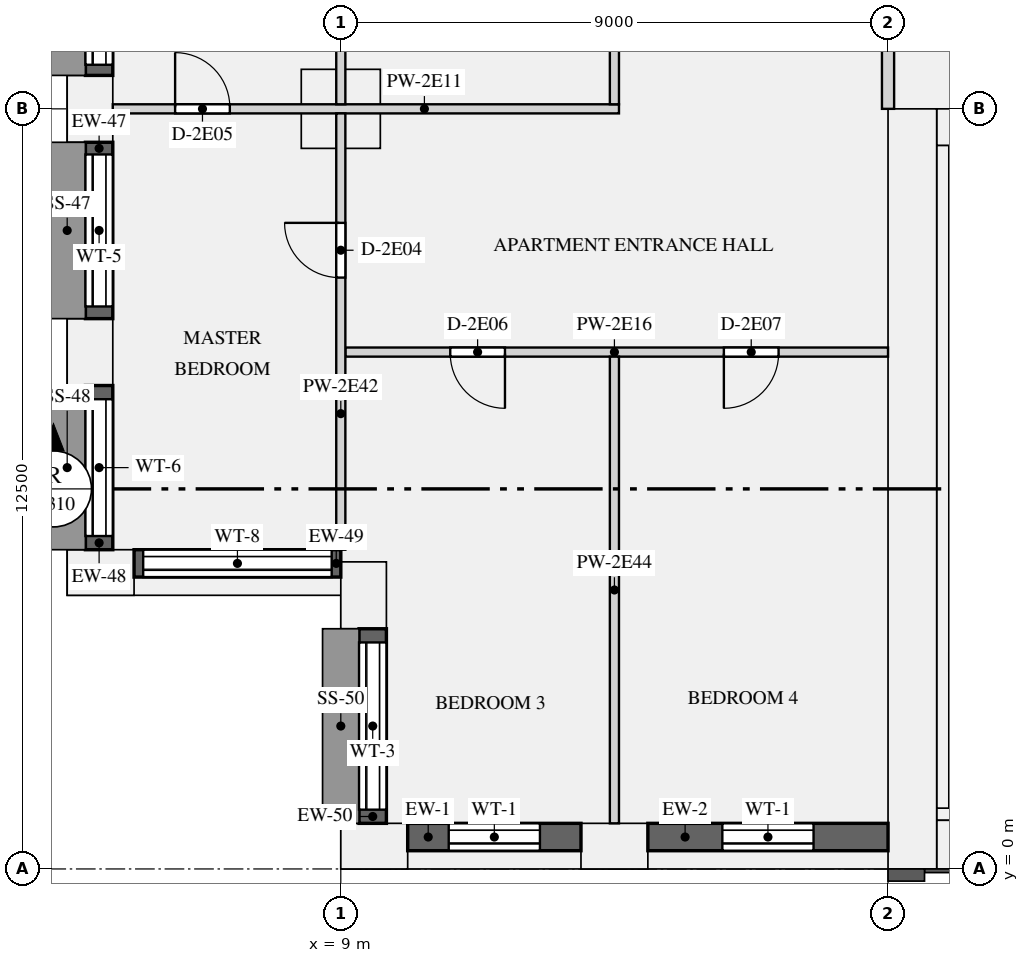
"""IFC4 building model, lengths in metres.
Left out: names, types, materials, properties, quantities, classifications, styles, units other than length and angle.
Written with IfcOpenShell. Run it as: python <this file> out.ifc"""

import sys

from ifc_helpers import new_model, si_unit, direction, frame, frame_2d, origin, origin_2d, place, context, subcontext, project, spatial, rectangle, extrude, element, fill, save


model = new_model("IFC4")
c1 = context("Model", 3, precision=1e-05, world=origin(), true_north=direction((0.0, 1.0)))
c2 = subcontext(c1, "Body", "Model", "MODEL_VIEW")
j1 = project(units=[si_unit("LENGTHUNIT", "METRE"), si_unit("PLANEANGLEUNIT", "RADIAN")], contexts=[c1])
p1 = place(None, origin())
s1 = spatial("IfcSite", under=j1, at=p1, CompositionType="ELEMENT")
p2 = place(p1, origin())
s2 = spatial("IfcBuilding", under=s1, at=p2, CompositionType="ELEMENT")
p3 = place(p2, frame((0.0, 0.0, 118.2)))
s3 = spatial("IfcBuildingStorey", under=s2, at=p3, CompositionType="ELEMENT", Elevation=118.2)
for number, where, z_axis, x_axis in (
    (1, (9.55, 0.375, 0.0), (0.0, 0.0, 1.0), (1.0, 0.0, 0.0)),
    (2, (13.5, 0.375, 0.0), (0.0, 0.0, 1.0), (1.0, 0.0, 0.0)),
    (3, (4.875, 12.5, 0.0), (0.0, 0.0, 1.0), (0.0, -1.0, 0.0)),
    (4, (4.875, 8.5, 0.0), (0.0, 0.0, 1.0), (0.0, -1.0, 0.0)),
    (5, (5.05, 4.875, 0.0), (0.0, 0.0, 1.0), (1.0, 0.0, 0.0)),
    (6, (9.375, 4.5, 0.0), (0.0, 0.0, 1.0), (0.0, -1.0, 0.0)),
):
    element("IfcColumn", number, at=place(p3, frame(where, z_axis=z_axis, x_axis=x_axis)), inside=s3, PredefinedType="USERDEFINED", context=c2, shape_type="SweptSolid", body=[
        extrude(rectangle(XDim=1.1, YDim=0.75, at=origin_2d()), origin(), (0.0, 0.0, 1.0), 3.15),
    ])
p4 = place(p3, frame((9.0, 12.5, 0.0), z_axis=(0.0, 0.0, 1.0), x_axis=(1.0, 0.0, 0.0)))
e7 = element("IfcColumn", 7, at=p4, inside=s3, PredefinedType="COLUMN", context=c2, shape_type="SweptSolid", body=[
    extrude(rectangle(XDim=1.3, YDim=1.3, at=origin_2d()), origin(), (0.0, 0.0, 1.0), 3.15),
])
p5 = place(p3, frame((18.4, 0.0, 0.0), z_axis=(0.0, 0.0, 1.0), x_axis=(0.0, 1.0, 0.0)))
e8 = element("IfcWall", 8, at=p5, inside=s3, PredefinedType="SHEAR", context=c2, shape_type="SweptSolid", body=[
    extrude(rectangle(XDim=12.5, YDim=0.8, at=frame_2d((6.25, 0.0))), origin(), (0.0, 0.0, 1.0), 3.15),
])
p6 = place(p3, frame((18.8, 0.4, 0.0), z_axis=(0.0, 0.0, 1.0), x_axis=(1.0, 0.0, 0.0)))
e9 = element("IfcWall", 9, at=p6, inside=s3, PredefinedType="SHEAR", context=c2, shape_type="SweptSolid", body=[
    extrude(rectangle(XDim=34.4, YDim=0.8, at=frame_2d((17.2, 0.0))), origin(), (0.0, 0.0, 1.0), 3.15),
])
p7 = place(p3, frame((18.8, 12.2, 0.0), z_axis=(0.0, 0.0, 1.0), x_axis=(1.0, 0.0, 0.0)))
e10 = element("IfcWall", 10, at=p7, inside=s3, PredefinedType="SHEAR", context=c2, shape_type="SweptSolid", body=[
    extrude(rectangle(XDim=34.4, YDim=0.6, at=frame_2d((17.2, 0.0))), origin(), (0.0, 0.0, 1.0), 3.15),
])
p8 = place(p7, frame((24.375, 0.0, 0.0)))
e11 = element("IfcOpeningElement", 11, at=p8, cuts=e10, PredefinedType="OPENING", context=c2, shape_type="SweptSolid", body=[
    extrude(rectangle(XDim=1.1, YDim=2.1, at=frame_2d((0.55, 1.05))), frame((0.0, 0.31, 0.0), z_axis=(0.0, -1.0, 0.0), x_axis=(1.0, 0.0, 0.0)), (0.0, 0.0, 1.0), 0.62),
])
p9 = place(p7, frame((26.625, 0.0, 0.0)))
e12 = element("IfcOpeningElement", 12, at=p9, cuts=e10, PredefinedType="OPENING", context=c2, shape_type="SweptSolid", body=[
    extrude(rectangle(XDim=1.1, YDim=2.1, at=frame_2d((0.55, 1.05))), frame((0.0, 0.31, 0.0), z_axis=(0.0, -1.0, 0.0), x_axis=(1.0, 0.0, 0.0)), (0.0, 0.0, 1.0), 0.62),
])
p10 = place(p7, frame((28.875, 0.0, 0.0)))
e13 = element("IfcOpeningElement", 13, at=p10, cuts=e10, PredefinedType="OPENING", context=c2, shape_type="SweptSolid", body=[
    extrude(rectangle(XDim=1.1, YDim=2.1, at=frame_2d((0.55, 1.05))), frame((0.0, 0.31, 0.0), z_axis=(0.0, -1.0, 0.0), x_axis=(1.0, 0.0, 0.0)), (0.0, 0.0, 1.0), 0.62),
])
p11 = place(p7, frame((11.75, 0.0, 0.0)))
e14 = element("IfcOpeningElement", 14, at=p11, cuts=e10, PredefinedType="OPENING", context=c2, shape_type="SweptSolid", body=[
    extrude(rectangle(XDim=0.9, YDim=2.1, at=frame_2d((0.45, 1.05))), frame((0.0, 0.31, 0.0), z_axis=(0.0, -1.0, 0.0), x_axis=(1.0, 0.0, 0.0)), (0.0, 0.0, 1.0), 0.62),
])
p12 = place(p7, frame((18.25, 0.0, 0.0)))
e15 = element("IfcOpeningElement", 15, at=p12, cuts=e10, PredefinedType="OPENING", context=c2, shape_type="SweptSolid", body=[
    extrude(rectangle(XDim=0.9, YDim=2.1, at=frame_2d((0.45, 1.05))), frame((0.0, 0.31, 0.0), z_axis=(0.0, -1.0, 0.0), x_axis=(1.0, 0.0, 0.0)), (0.0, 0.0, 1.0), 0.62),
])
p13 = place(p7, frame((1.35, 0.0, 0.0)))
e16 = element("IfcOpeningElement", 16, at=p13, cuts=e10, PredefinedType="OPENING", context=c2, shape_type="SweptSolid", body=[
    extrude(rectangle(XDim=1.2, YDim=2.1, at=frame_2d((0.6, 1.05))), frame((0.0, 0.31, 0.0), z_axis=(0.0, -1.0, 0.0), x_axis=(1.0, 0.0, 0.0)), (0.0, 0.0, 1.0), 0.62),
])
p14 = place(p7, frame((31.85, 0.0, 0.0)))
e17 = element("IfcOpeningElement", 17, at=p14, cuts=e10, PredefinedType="OPENING", context=c2, shape_type="SweptSolid", body=[
    extrude(rectangle(XDim=1.2, YDim=2.1, at=frame_2d((0.6, 1.05))), frame((0.0, 0.31, 0.0), z_axis=(0.0, -1.0, 0.0), x_axis=(1.0, 0.0, 0.0)), (0.0, 0.0, 1.0), 0.62),
])
p15 = place(p3, frame((18.9, 1.0, 0.0), z_axis=(0.0, 0.0, 1.0), x_axis=(0.0, 1.0, 0.0)))
e18 = element("IfcWall", 18, at=p15, inside=s3, PredefinedType="SHEAR", context=c2, shape_type="SweptSolid", body=[
    extrude(rectangle(XDim=10.9, YDim=0.2, at=frame_2d((5.45, 0.0))), origin(), (0.0, 0.0, 1.0), 3.15),
])
p16 = place(p3, frame((18.8, 0.9, 0.0), z_axis=(0.0, 0.0, 1.0), x_axis=(1.0, 0.0, 0.0)))
e19 = element("IfcWall", 19, at=p16, inside=s3, PredefinedType="SHEAR", context=c2, shape_type="SweptSolid", body=[
    extrude(rectangle(XDim=34.4, YDim=0.2, at=frame_2d((17.2, 0.0))), origin(), (0.0, 0.0, 1.0), 3.15),
])
p17 = place(p3, frame((19.0, 3.4, 0.0), z_axis=(0.0, 0.0, 1.0), x_axis=(1.0, 0.0, 0.0)))
e20 = element("IfcWall", 20, at=p17, inside=s3, PredefinedType="SHEAR", context=c2, shape_type="SweptSolid", body=[
    extrude(rectangle(XDim=2.55, YDim=0.3, at=frame_2d((1.275, 0.0))), origin(), (0.0, 0.0, 1.0), 3.15),
])
p18 = place(p17, frame((0.675, 0.0, 0.0)))
e21 = element("IfcOpeningElement", 21, at=p18, cuts=e20, PredefinedType="OPENING", context=c2, shape_type="SweptSolid", body=[
    extrude(rectangle(XDim=1.2, YDim=2.1, at=frame_2d((0.6, 1.05))), frame((0.0, 0.16, 0.0), z_axis=(0.0, -1.0, 0.0), x_axis=(1.0, 0.0, 0.0)), (0.0, 0.0, 1.0), 0.32),
])
p19 = place(p3, frame((10.1, 0.525, 0.9), z_axis=(0.0, 0.0, 1.0), x_axis=(1.0, 0.0, 0.0)))
e22 = element("IfcWall", 22, at=p19, inside=s3, PredefinedType="SOLIDWALL", context=c2, shape_type="SweptSolid", body=[
    extrude(rectangle(XDim=2.85, YDim=0.45, at=frame_2d((1.425, 0.0))), origin(), (0.0, 0.0, 1.0), 1.93),
])
p20 = place(p19, frame((0.675, 0.0, 0.15)))
e23 = element("IfcOpeningElement", 23, at=p20, cuts=e22, PredefinedType="OPENING", context=c2, shape_type="SweptSolid", body=[
    extrude(rectangle(XDim=1.5, YDim=1.5, at=frame_2d((0.75, 0.75))), frame((0.0, 0.235, 0.0), z_axis=(0.0, -1.0, 0.0), x_axis=(1.0, 0.0, 0.0)), (0.0, 0.0, 1.0), 0.47),
])
p21 = place(p3, frame((14.05, 0.525, 0.9), z_axis=(0.0, 0.0, 1.0), x_axis=(1.0, 0.0, 0.0)))
e24 = element("IfcWall", 24, at=p21, inside=s3, PredefinedType="SOLIDWALL", context=c2, shape_type="SweptSolid", body=[
    extrude(rectangle(XDim=3.95, YDim=0.45, at=frame_2d((1.975, 0.0))), origin(), (0.0, 0.0, 1.0), 1.93),
])
p22 = place(p21, frame((1.225, 0.0, 0.15)))
e25 = element("IfcOpeningElement", 25, at=p22, cuts=e24, PredefinedType="OPENING", context=c2, shape_type="SweptSolid", body=[
    extrude(rectangle(XDim=1.5, YDim=1.5, at=frame_2d((0.75, 0.75))), frame((0.0, 0.235, 0.0), z_axis=(0.0, -1.0, 0.0), x_axis=(1.0, 0.0, 0.0)), (0.0, 0.0, 1.0), 0.47),
])
p23 = place(p3, frame((5.025, 15.4, 0.9), z_axis=(0.0, 0.0, 1.0), x_axis=(0.0, -1.0, 0.0)))
e26 = element("IfcWall", 26, at=p23, inside=s3, PredefinedType="SOLIDWALL", context=c2, shape_type="SweptSolid", body=[
    extrude(rectangle(XDim=2.35, YDim=0.45, at=frame_2d((1.175, 0.0))), origin(), (0.0, 0.0, 1.0), 1.93),
])
p24 = place(p23, frame((0.175, 0.0, 0.15)))
e27 = element("IfcOpeningElement", 27, at=p24, cuts=e26, PredefinedType="OPENING", context=c2, shape_type="SweptSolid", body=[
    extrude(rectangle(XDim=2.0, YDim=1.5, at=frame_2d((1.0, 0.75))), frame((0.0, 0.235, 0.0), z_axis=(0.0, -1.0, 0.0), x_axis=(1.0, 0.0, 0.0)), (0.0, 0.0, 1.0), 0.47),
])
p25 = place(p3, frame((5.025, 11.95, 0.9), z_axis=(0.0, 0.0, 1.0), x_axis=(0.0, -1.0, 0.0)))
e28 = element("IfcWall", 28, at=p25, inside=s3, PredefinedType="SOLIDWALL", context=c2, shape_type="SweptSolid", body=[
    extrude(rectangle(XDim=2.9, YDim=0.45, at=frame_2d((1.45, 0.0))), origin(), (0.0, 0.0, 1.0), 1.93),
])
p26 = place(p25, frame((0.2, 0.0, 0.15)))
e29 = element("IfcOpeningElement", 29, at=p26, cuts=e28, PredefinedType="OPENING", context=c2, shape_type="SweptSolid", body=[
    extrude(rectangle(XDim=2.5, YDim=1.5, at=frame_2d((1.25, 0.75))), frame((0.0, 0.235, 0.0), z_axis=(0.0, -1.0, 0.0), x_axis=(1.0, 0.0, 0.0)), (0.0, 0.0, 1.0), 0.47),
])
p27 = place(p3, frame((5.025, 7.95, 0.9), z_axis=(0.0, 0.0, 1.0), x_axis=(0.0, -1.0, 0.0)))
e30 = element("IfcWall", 30, at=p27, inside=s3, PredefinedType="SOLIDWALL", context=c2, shape_type="SweptSolid", body=[
    extrude(rectangle(XDim=2.7, YDim=0.45, at=frame_2d((1.35, 0.0))), origin(), (0.0, 0.0, 1.0), 1.93),
])
p28 = place(p27, frame((0.225, 0.0, 0.15)))
e31 = element("IfcOpeningElement", 31, at=p28, cuts=e30, PredefinedType="OPENING", context=c2, shape_type="SweptSolid", body=[
    extrude(rectangle(XDim=2.25, YDim=1.5, at=frame_2d((1.125, 0.75))), frame((0.0, 0.235, 0.0), z_axis=(0.0, -1.0, 0.0), x_axis=(1.0, 0.0, 0.0)), (0.0, 0.0, 1.0), 0.47),
])
p29 = place(p3, frame((5.6, 5.025, 0.9), z_axis=(0.0, 0.0, 1.0), x_axis=(1.0, 0.0, 0.0)))
e32 = element("IfcWall", 32, at=p29, inside=s3, PredefinedType="SOLIDWALL", context=c2, shape_type="SweptSolid", body=[
    extrude(rectangle(XDim=3.4, YDim=0.45, at=frame_2d((1.7, 0.0))), origin(), (0.0, 0.0, 1.0), 1.93),
])
p30 = place(p29, frame((0.15, 0.0, 0.15)))
e33 = element("IfcOpeningElement", 33, at=p30, cuts=e32, PredefinedType="OPENING", context=c2, shape_type="SweptSolid", body=[
    extrude(rectangle(XDim=3.1, YDim=1.5, at=frame_2d((1.55, 0.75))), frame((0.0, 0.235, 0.0), z_axis=(0.0, -1.0, 0.0), x_axis=(1.0, 0.0, 0.0)), (0.0, 0.0, 1.0), 0.47),
])
p31 = place(p3, frame((9.525, 3.95, 0.9), z_axis=(0.0, 0.0, 1.0), x_axis=(0.0, -1.0, 0.0)))
e34 = element("IfcWall", 34, at=p31, inside=s3, PredefinedType="SOLIDWALL", context=c2, shape_type="SweptSolid", body=[
    extrude(rectangle(XDim=3.2, YDim=0.45, at=frame_2d((1.6, 0.0))), origin(), (0.0, 0.0, 1.0), 1.93),
])
p32 = place(p31, frame((0.225, 0.0, 0.15)))
e35 = element("IfcOpeningElement", 35, at=p32, cuts=e34, PredefinedType="OPENING", context=c2, shape_type="SweptSolid", body=[
    extrude(rectangle(XDim=2.75, YDim=1.5, at=frame_2d((1.375, 0.75))), frame((0.0, 0.235, 0.0), z_axis=(0.0, -1.0, 0.0), x_axis=(1.0, 0.0, 0.0)), (0.0, 0.0, 1.0), 0.47),
])
p33 = place(p3, frame((18.0, 12.5, 0.0), z_axis=(0.0, 0.0, 1.0), x_axis=(0.0, 1.0, 0.0)))
e36 = element("IfcWall", 36, at=p33, inside=s3, PredefinedType="PARTITIONING", context=c2, shape_type="SweptSolid", body=[
    extrude(rectangle(XDim=3.4, YDim=0.2, at=frame_2d((1.7, 0.0))), origin(), (0.0, 0.0, 1.0), 2.83),
])
p34 = place(p3, frame((5.25, 12.5, 0.0), z_axis=(0.0, 0.0, 1.0), x_axis=(1.0, 0.0, 0.0)))
e37 = element("IfcWall", 37, at=p34, inside=s3, PredefinedType="PARTITIONING", context=c2, shape_type="SweptSolid", body=[
    extrude(rectangle(XDim=8.325, YDim=0.15, at=frame_2d((4.163, 0.0))), origin(), (0.0, 0.0, 1.0), 2.83),
])
p35 = place(p34, frame((1.025, 0.0, 0.0)))
e38 = element("IfcOpeningElement", 38, at=p35, cuts=e37, PredefinedType="OPENING", context=c2, shape_type="SweptSolid", body=[
    extrude(rectangle(XDim=0.9, YDim=2.1, at=frame_2d((0.45, 1.05))), frame((0.0, 0.085, 0.0), z_axis=(0.0, -1.0, 0.0), x_axis=(1.0, 0.0, 0.0)), (0.0, 0.0, 1.0), 0.17),
])
p36 = place(p3, frame((9.075, 8.5, 0.0), z_axis=(0.0, 0.0, 1.0), x_axis=(1.0, 0.0, 0.0)))
e39 = element("IfcWall", 39, at=p36, inside=s3, PredefinedType="PARTITIONING", context=c2, shape_type="SweptSolid", body=[
    extrude(rectangle(XDim=8.925, YDim=0.15, at=frame_2d((4.462, 0.0))), origin(), (0.0, 0.0, 1.0), 2.83),
])
p37 = place(p36, frame((1.725, 0.0, 0.0)))
e40 = element("IfcOpeningElement", 40, at=p37, cuts=e39, PredefinedType="OPENING", context=c2, shape_type="SweptSolid", body=[
    extrude(rectangle(XDim=0.9, YDim=2.1, at=frame_2d((0.45, 1.05))), frame((0.0, 0.085, 0.0), z_axis=(0.0, -1.0, 0.0), x_axis=(1.0, 0.0, 0.0)), (0.0, 0.0, 1.0), 0.17),
])
p38 = place(p36, frame((6.225, 0.0, 0.0)))
e41 = element("IfcOpeningElement", 41, at=p38, cuts=e39, PredefinedType="OPENING", context=c2, shape_type="SweptSolid", body=[
    extrude(rectangle(XDim=0.9, YDim=2.1, at=frame_2d((0.45, 1.05))), frame((0.0, 0.085, 0.0), z_axis=(0.0, -1.0, 0.0), x_axis=(1.0, 0.0, 0.0)), (0.0, 0.0, 1.0), 0.17),
])
p39 = place(p3, frame((9.0, 5.25, 0.0), z_axis=(0.0, 0.0, 1.0), x_axis=(0.0, 1.0, 0.0)))
e42 = element("IfcWall", 42, at=p39, inside=s3, PredefinedType="PARTITIONING", context=c2, shape_type="SweptSolid", body=[
    extrude(rectangle(XDim=7.175, YDim=0.15, at=frame_2d((3.587, 0.0))), origin(), (0.0, 0.0, 1.0), 2.83),
])
p40 = place(p39, frame((4.475, 0.0, 0.0)))
e43 = element("IfcOpeningElement", 43, at=p40, cuts=e42, PredefinedType="OPENING", context=c2, shape_type="SweptSolid", body=[
    extrude(rectangle(XDim=0.9, YDim=2.1, at=frame_2d((0.45, 1.05))), frame((0.0, 0.085, 0.0), z_axis=(0.0, -1.0, 0.0), x_axis=(1.0, 0.0, 0.0)), (0.0, 0.0, 1.0), 0.17),
])
p41 = place(p3, frame((9.0, 12.575, 0.0), z_axis=(0.0, 0.0, 1.0), x_axis=(0.0, 1.0, 0.0)))
e44 = element("IfcWall", 44, at=p41, inside=s3, PredefinedType="PARTITIONING", context=c2, shape_type="SweptSolid", body=[
    extrude(rectangle(XDim=3.85, YDim=0.15, at=frame_2d((1.925, 0.0))), origin(), (0.0, 0.0, 1.0), 2.83),
])
p42 = place(p3, frame((13.5, 0.75, 0.0), z_axis=(0.0, 0.0, 1.0), x_axis=(0.0, 1.0, 0.0)))
e45 = element("IfcWall", 45, at=p42, inside=s3, PredefinedType="PARTITIONING", context=c2, shape_type="SweptSolid", body=[
    extrude(rectangle(XDim=7.675, YDim=0.15, at=frame_2d((3.837, 0.0))), origin(), (0.0, 0.0, 1.0), 2.83),
])
p43 = place(p3, frame((13.5, 12.575, 0.0), z_axis=(0.0, 0.0, 1.0), x_axis=(0.0, 1.0, 0.0)))
e46 = element("IfcWall", 46, at=p43, inside=s3, PredefinedType="PARTITIONING", context=c2, shape_type="SweptSolid", body=[
    extrude(rectangle(XDim=10.325, YDim=0.15, at=frame_2d((5.163, 0.0))), origin(), (0.0, 0.0, 1.0), 2.83),
])
p44 = place(p43, frame((1.475, 0.0, 0.0)))
e47 = element("IfcOpeningElement", 47, at=p44, cuts=e46, PredefinedType="OPENING", context=c2, shape_type="SweptSolid", body=[
    extrude(rectangle(XDim=0.9, YDim=2.1, at=frame_2d((0.45, 1.05))), frame((0.0, 0.085, 0.0), z_axis=(0.0, -1.0, 0.0), x_axis=(1.0, 0.0, 0.0)), (0.0, 0.0, 1.0), 0.17),
])
p45 = place(p43, frame((6.45, 0.0, 0.0)))
e48 = element("IfcOpeningElement", 48, at=p45, cuts=e46, PredefinedType="OPENING", context=c2, shape_type="SweptSolid", body=[
    extrude(rectangle(XDim=1.5, YDim=2.1, at=frame_2d((0.75, 1.05))), frame((0.0, 0.085, 0.0), z_axis=(0.0, -1.0, 0.0), x_axis=(1.0, 0.0, 0.0)), (0.0, 0.0, 1.0), 0.17),
])
p46 = place(p20, origin())
e49 = element("IfcWindow", 49, at=p46, inside=s3, PartitioningType="SINGLE_PANEL", PredefinedType="WINDOW", context=c2, shape_type="SweptSolid", body=[
    extrude(rectangle(XDim=1.5, YDim=1.5, at=frame_2d((0.75, 0.75))), frame((0.0, -0.065, 0.0), z_axis=(0.0, -1.0, 0.0), x_axis=(1.0, 0.0, 0.0)), (0.0, 0.0, 1.0), 0.06),
])
fill(e23, e49)
p47 = place(p22, origin())
e50 = element("IfcWindow", 50, at=p47, inside=s3, PartitioningType="SINGLE_PANEL", PredefinedType="WINDOW", context=c2, shape_type="SweptSolid", body=[
    extrude(rectangle(XDim=1.5, YDim=1.5, at=frame_2d((0.75, 0.75))), frame((0.0, -0.065, 0.0), z_axis=(0.0, -1.0, 0.0), x_axis=(1.0, 0.0, 0.0)), (0.0, 0.0, 1.0), 0.06),
])
fill(e25, e50)
p48 = place(p24, origin())
e51 = element("IfcWindow", 51, at=p48, inside=s3, PartitioningType="SINGLE_PANEL", PredefinedType="WINDOW", context=c2, shape_type="SweptSolid", body=[
    extrude(rectangle(XDim=2.0, YDim=1.5, at=frame_2d((1.0, 0.75))), frame((0.0, -0.065, 0.0), z_axis=(0.0, -1.0, 0.0), x_axis=(1.0, 0.0, 0.0)), (0.0, 0.0, 1.0), 0.06),
])
fill(e27, e51)
p49 = place(p26, origin())
e52 = element("IfcWindow", 52, at=p49, inside=s3, PartitioningType="SINGLE_PANEL", PredefinedType="WINDOW", context=c2, shape_type="SweptSolid", body=[
    extrude(rectangle(XDim=2.5, YDim=1.5, at=frame_2d((1.25, 0.75))), frame((0.0, -0.065, 0.0), z_axis=(0.0, -1.0, 0.0), x_axis=(1.0, 0.0, 0.0)), (0.0, 0.0, 1.0), 0.06),
])
fill(e29, e52)
p50 = place(p28, origin())
e53 = element("IfcWindow", 53, at=p50, inside=s3, PartitioningType="SINGLE_PANEL", PredefinedType="WINDOW", context=c2, shape_type="SweptSolid", body=[
    extrude(rectangle(XDim=2.25, YDim=1.5, at=frame_2d((1.125, 0.75))), frame((0.0, -0.065, 0.0), z_axis=(0.0, -1.0, 0.0), x_axis=(1.0, 0.0, 0.0)), (0.0, 0.0, 1.0), 0.06),
])
fill(e31, e53)
p51 = place(p30, origin())
e54 = element("IfcWindow", 54, at=p51, inside=s3, PartitioningType="SINGLE_PANEL", PredefinedType="WINDOW", context=c2, shape_type="SweptSolid", body=[
    extrude(rectangle(XDim=3.1, YDim=1.5, at=frame_2d((1.55, 0.75))), frame((0.0, -0.065, 0.0), z_axis=(0.0, -1.0, 0.0), x_axis=(1.0, 0.0, 0.0)), (0.0, 0.0, 1.0), 0.06),
])
fill(e33, e54)
p52 = place(p32, origin())
e55 = element("IfcWindow", 55, at=p52, inside=s3, PartitioningType="SINGLE_PANEL", PredefinedType="WINDOW", context=c2, shape_type="SweptSolid", body=[
    extrude(rectangle(XDim=2.75, YDim=1.5, at=frame_2d((1.375, 0.75))), frame((0.0, -0.065, 0.0), z_axis=(0.0, -1.0, 0.0), x_axis=(1.0, 0.0, 0.0)), (0.0, 0.0, 1.0), 0.06),
])
fill(e35, e55)
p53 = place(p40, origin())
e56 = element("IfcDoor", 56, at=p53, inside=s3, OperationType="SINGLE_SWING_RIGHT", PredefinedType="DOOR", context=c2, shape_type="SweptSolid", body=[
    extrude(rectangle(XDim=0.9, YDim=2.1, at=frame_2d((0.45, 1.05))), frame((0.0, 0.025, 0.0), z_axis=(0.0, -1.0, 0.0), x_axis=(1.0, 0.0, 0.0)), (0.0, 0.0, 1.0), 0.05),
])
fill(e43, e56)
p54 = place(p35, origin())
e57 = element("IfcDoor", 57, at=p54, inside=s3, OperationType="SINGLE_SWING_LEFT", PredefinedType="DOOR", context=c2, shape_type="SweptSolid", body=[
    extrude(rectangle(XDim=0.9, YDim=2.1, at=frame_2d((0.45, 1.05))), frame((0.0, 0.025, 0.0), z_axis=(0.0, -1.0, 0.0), x_axis=(1.0, 0.0, 0.0)), (0.0, 0.0, 1.0), 0.05),
])
fill(e38, e57)
p55 = place(p37, frame((0.9, 0.0, 0.0), z_axis=(0.0, 0.0, 1.0), x_axis=(-1.0, 0.0, 0.0)))
e58 = element("IfcDoor", 58, at=p55, inside=s3, OperationType="SINGLE_SWING_LEFT", PredefinedType="DOOR", context=c2, shape_type="SweptSolid", body=[
    extrude(rectangle(XDim=0.9, YDim=2.1, at=frame_2d((0.45, 1.05))), frame((0.0, 0.025, 0.0), z_axis=(0.0, -1.0, 0.0), x_axis=(1.0, 0.0, 0.0)), (0.0, 0.0, 1.0), 0.05),
])
fill(e40, e58)
p56 = place(p38, frame((0.9, 0.0, 0.0), z_axis=(0.0, 0.0, 1.0), x_axis=(-1.0, 0.0, 0.0)))
e59 = element("IfcDoor", 59, at=p56, inside=s3, OperationType="SINGLE_SWING_RIGHT", PredefinedType="DOOR", context=c2, shape_type="SweptSolid", body=[
    extrude(rectangle(XDim=0.9, YDim=2.1, at=frame_2d((0.45, 1.05))), frame((0.0, 0.025, 0.0), z_axis=(0.0, -1.0, 0.0), x_axis=(1.0, 0.0, 0.0)), (0.0, 0.0, 1.0), 0.05),
])
fill(e41, e59)
save(model, sys.argv[1])
